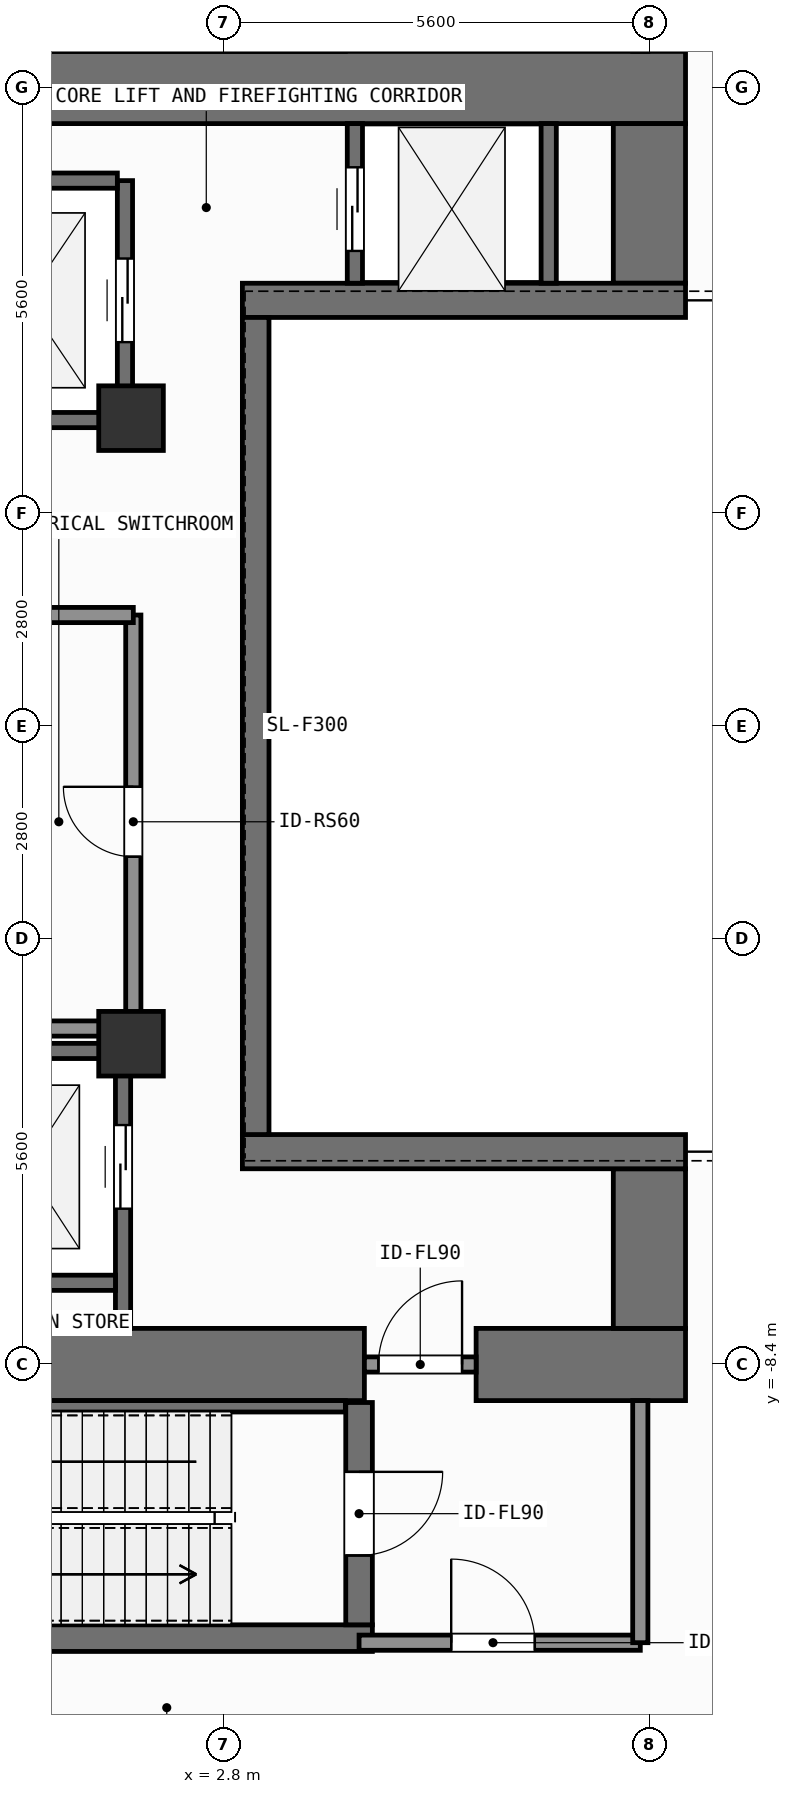
"""IFC4 building model, lengths in metres.
Left out: names, types, materials, properties, quantities, classifications, styles, units other than length and angle.
Written with IfcOpenShell. Run it as: python <this file> out.ifc"""

import sys

from ifc_helpers import new_model, si_unit, direction, frame, frame_2d, origin, origin_2d, place, context, subcontext, project, spatial, rectangle, extrude, element, fill, save


model = new_model("IFC4")
c1 = context("Model", 3, precision=1e-05, world=origin(), true_north=direction((0.0, 1.0)))
c2 = subcontext(c1, "Body", "Model", "MODEL_VIEW")
j1 = project(units=[si_unit("LENGTHUNIT", "METRE"), si_unit("PLANEANGLEUNIT", "RADIAN")], contexts=[c1])
p1 = place(None, origin())
s1 = spatial("IfcSite", under=j1, at=p1, CompositionType="ELEMENT")
p2 = place(p1, origin())
s2 = spatial("IfcBuilding", under=s1, at=p2, CompositionType="ELEMENT")
p3 = place(p2, frame((0.0, 0.0, 156.3)))
s3 = spatial("IfcBuildingStorey", under=s2, at=p3, CompositionType="ELEMENT", Elevation=156.3)
p4 = place(p3, frame((-2.62, -8.4, 0.0), z_axis=(0.0, 0.0, 1.0), x_axis=(1.0, 0.0, 0.0)))
e1 = element("IfcWall", 1, at=p4, inside=s3, PredefinedType="SHEAR", context=c2, shape_type="SweptSolid", body=[
    extrude(rectangle(XDim=7.27, YDim=0.95, at=frame_2d((3.635, 0.0))), origin(), (0.0, 0.0, 1.0), 7.8),
])
p5 = place(p3, frame((6.12, -8.4, 0.0), z_axis=(0.0, 0.0, 1.0), x_axis=(1.0, 0.0, 0.0)))
e2 = element("IfcWall", 2, at=p5, inside=s3, PredefinedType="SHEAR", context=c2, shape_type="SweptSolid", body=[
    extrude(rectangle(XDim=2.755, YDim=0.95, at=frame_2d((1.377, 0.0))), origin(), (0.0, 0.0, 1.0), 7.8),
])
p6 = place(p3, frame((-7.55, 8.4, 0.0), z_axis=(0.0, 0.0, 1.0), x_axis=(1.0, 0.0, 0.0)))
e3 = element("IfcWall", 3, at=p6, inside=s3, PredefinedType="SHEAR", context=c2, shape_type="SweptSolid", body=[
    extrude(rectangle(XDim=16.425, YDim=0.95, at=frame_2d((8.212, 0.0))), origin(), (0.0, 0.0, 1.0), 7.8),
])
for number, where, z_axis, x_axis in (
    (4, (8.4, -7.925, 0.0), (0.0, 0.0, 1.0), (0.0, 1.0, 0.0)),
    (5, (8.4, 5.825, 0.0), (0.0, 0.0, 1.0), (0.0, 1.0, 0.0)),
):
    element("IfcWall", number, at=place(p3, frame(where, z_axis=z_axis, x_axis=x_axis)), inside=s3, PredefinedType="SHEAR", context=c2, shape_type="SweptSolid", body=[
        extrude(rectangle(XDim=2.1, YDim=0.95, at=frame_2d((1.05, 0.0))), origin(), (0.0, 0.0, 1.0), 7.8),
    ])
for number, where, z_axis, x_axis in (
    (6, (3.045, -5.6, 0.0), (0.0, 0.0, 1.0), (1.0, 0.0, 0.0)),
    (7, (3.045, 5.6, 0.0), (0.0, 0.0, 1.0), (1.0, 0.0, 0.0)),
):
    element("IfcWall", number, at=place(p3, frame(where, z_axis=z_axis, x_axis=x_axis)), inside=s3, PredefinedType="SHEAR", context=c2, shape_type="SweptSolid", body=[
        extrude(rectangle(XDim=5.83, YDim=0.45, at=frame_2d((2.915, 0.0))), origin(), (0.0, 0.0, 1.0), 7.8),
    ])
p7 = place(p3, frame((3.22, -5.375, 0.0), z_axis=(0.0, 0.0, 1.0), x_axis=(0.0, 1.0, 0.0)))
e8 = element("IfcWall", 8, at=p7, inside=s3, PredefinedType="SHEAR", context=c2, shape_type="SweptSolid", body=[
    extrude(rectangle(XDim=10.75, YDim=0.35, at=frame_2d((5.375, 0.0))), origin(), (0.0, 0.0, 1.0), 7.8),
])
p8 = place(p3, frame((-2.555, -12.0, 0.0), z_axis=(0.0, 0.0, 1.0), x_axis=(1.0, 0.0, 0.0)))
e9 = element("IfcWall", 9, at=p8, inside=s3, PredefinedType="SHEAR", context=c2, shape_type="SweptSolid", body=[
    extrude(rectangle(XDim=7.31, YDim=0.35, at=frame_2d((3.655, 0.0))), origin(), (0.0, 0.0, 1.0), 7.8),
])
p9 = place(p3, frame((-2.2, -8.95, 0.0), z_axis=(0.0, 0.0, 1.0), x_axis=(1.0, 0.0, 0.0)))
e10 = element("IfcWall", 10, at=p9, inside=s3, PredefinedType="SHEAR", context=c2, shape_type="SweptSolid", body=[
    extrude(rectangle(XDim=6.6, YDim=0.15, at=frame_2d((3.3, 0.0))), origin(), (0.0, 0.0, 1.0), 7.8),
])
p10 = place(p3, frame((4.58, -8.9, 0.0), z_axis=(0.0, 0.0, 1.0), x_axis=(0.0, -1.0, 0.0)))
e11 = element("IfcWall", 11, at=p10, inside=s3, PredefinedType="SHEAR", context=c2, shape_type="SweptSolid", body=[
    extrude(rectangle(XDim=2.925, YDim=0.35, at=frame_2d((1.462, 0.0))), origin(), (0.0, 0.0, 1.0), 7.8),
])
p11 = place(p10, frame((0.913, 0.0, 0.0)))
e12 = element("IfcOpeningElement", 12, at=p11, cuts=e11, PredefinedType="OPENING", context=c2, shape_type="SweptSolid", body=[
    extrude(rectangle(XDim=1.1, YDim=2.15, at=frame_2d((0.55, 1.075))), frame((0.0, 0.185, 0.0), z_axis=(0.0, -1.0, 0.0), x_axis=(1.0, 0.0, 0.0)), (0.0, 0.0, 1.0), 0.37),
])
for number, where, z_axis, x_axis in (
    (13, (1.58, -4.18, 0.0), (0.0, 0.0, 1.0), (1.0, 0.0, 0.0)),
    (14, (1.58, 4.05, 0.0), (0.0, 0.0, 1.0), (1.0, 0.0, 0.0)),
):
    element("IfcColumn", number, at=place(p3, frame(where, z_axis=z_axis, x_axis=x_axis)), inside=s3, PredefinedType="COLUMN", context=c2, shape_type="SweptSolid", body=[
        extrude(rectangle(XDim=0.85, YDim=0.85, at=origin_2d()), origin(), (0.0, 0.0, 1.0), 7.8),
    ])
p12 = place(p3, frame((1.5, 4.025, 0.0), z_axis=(0.0, 0.0, 1.0), x_axis=(0.0, 1.0, 0.0)))
e15 = element("IfcWall", 15, at=p12, inside=s3, PredefinedType="SHEAR", context=c2, shape_type="SweptSolid", body=[
    extrude(rectangle(XDim=3.15, YDim=0.2, at=frame_2d((1.575, 0.0))), origin(), (0.0, 0.0, 1.0), 7.58),
])
p13 = place(p12, frame((1.025, 0.0, 0.0)))
e16 = element("IfcOpeningElement", 16, at=p13, cuts=e15, PredefinedType="OPENING", context=c2, shape_type="SweptSolid", body=[
    extrude(rectangle(XDim=1.1, YDim=2.2, at=frame_2d((0.55, 1.1))), frame((0.0, 0.11, 0.0), z_axis=(0.0, -1.0, 0.0), x_axis=(1.0, 0.0, 0.0)), (0.0, 0.0, 1.0), 0.22),
])
for number, where, z_axis, x_axis in (
    (17, (-1.0, 4.025, 0.0), (0.0, 0.0, 1.0), (1.0, 0.0, 0.0)),
    (18, (-1.0, 7.175, 0.0), (0.0, 0.0, 1.0), (1.0, 0.0, 0.0)),
):
    element("IfcWall", number, at=place(p3, frame(where, z_axis=z_axis, x_axis=x_axis)), inside=s3, PredefinedType="SHEAR", context=c2, shape_type="SweptSolid", body=[
        extrude(rectangle(XDim=2.4, YDim=0.2, at=frame_2d((1.2, 0.0))), origin(), (0.0, 0.0, 1.0), 7.58),
    ])
p14 = place(p3, frame((1.475, -7.925, 0.0), z_axis=(0.0, 0.0, 1.0), x_axis=(0.0, 1.0, 0.0)))
e19 = element("IfcWall", 19, at=p14, inside=s3, PredefinedType="SHEAR", context=c2, shape_type="SweptSolid", body=[
    extrude(rectangle(XDim=3.65, YDim=0.2, at=frame_2d((1.825, 0.0))), origin(), (0.0, 0.0, 1.0), 7.58),
])
p15 = place(p14, frame((1.575, 0.0, 0.0)))
e20 = element("IfcOpeningElement", 20, at=p15, cuts=e19, PredefinedType="OPENING", context=c2, shape_type="SweptSolid", body=[
    extrude(rectangle(XDim=1.1, YDim=2.2, at=frame_2d((0.55, 1.1))), frame((0.0, 0.11, 0.0), z_axis=(0.0, -1.0, 0.0), x_axis=(1.0, 0.0, 0.0)), (0.0, 0.0, 1.0), 0.22),
])
for number, where, z_axis, x_axis in (
    (21, (-0.975, -7.325, 0.0), (0.0, 0.0, 1.0), (1.0, 0.0, 0.0)),
    (22, (-0.975, -4.275, 0.0), (0.0, 0.0, 1.0), (1.0, 0.0, 0.0)),
):
    element("IfcWall", number, at=place(p3, frame(where, z_axis=z_axis, x_axis=x_axis)), inside=s3, PredefinedType="SHEAR", context=c2, shape_type="SweptSolid", body=[
        extrude(rectangle(XDim=2.35, YDim=0.2, at=frame_2d((1.175, 0.0))), origin(), (0.0, 0.0, 1.0), 7.58),
    ])
p16 = place(p3, frame((4.525, 5.825, 0.0), z_axis=(0.0, 0.0, 1.0), x_axis=(0.0, 1.0, 0.0)))
e23 = element("IfcWall", 23, at=p16, inside=s3, PredefinedType="SHEAR", context=c2, shape_type="SweptSolid", body=[
    extrude(rectangle(XDim=2.1, YDim=0.2, at=frame_2d((1.05, 0.0))), origin(), (0.0, 0.0, 1.0), 7.58),
])
p17 = place(p16, frame((0.425, 0.0, 0.0)))
e24 = element("IfcOpeningElement", 24, at=p17, cuts=e23, PredefinedType="OPENING", context=c2, shape_type="SweptSolid", body=[
    extrude(rectangle(XDim=1.1, YDim=2.2, at=frame_2d((0.55, 1.1))), frame((0.0, 0.11, 0.0), z_axis=(0.0, -1.0, 0.0), x_axis=(1.0, 0.0, 0.0)), (0.0, 0.0, 1.0), 0.22),
])
p18 = place(p3, frame((7.075, 5.825, 0.0), z_axis=(0.0, 0.0, 1.0), x_axis=(0.0, 1.0, 0.0)))
e25 = element("IfcWall", 25, at=p18, inside=s3, PredefinedType="SHEAR", context=c2, shape_type="SweptSolid", body=[
    extrude(rectangle(XDim=2.1, YDim=0.2, at=frame_2d((1.05, 0.0))), origin(), (0.0, 0.0, 1.0), 7.58),
])
p19 = place(p3, frame((4.58, -12.06, 0.0), z_axis=(0.0, 0.0, 1.0), x_axis=(1.0, 0.0, 0.0)))
e26 = element("IfcWall", 26, at=p19, inside=s3, PredefinedType="SOLIDWALL", context=c2, shape_type="SweptSolid", body=[
    extrude(rectangle(XDim=3.7, YDim=0.2, at=frame_2d((1.85, 0.0))), origin(), (0.0, 0.0, 1.0), 7.58),
])
p20 = place(p19, frame((1.212, 0.0, 0.0)))
e27 = element("IfcOpeningElement", 27, at=p20, cuts=e26, PredefinedType="OPENING", context=c2, shape_type="SweptSolid", body=[
    extrude(rectangle(XDim=1.1, YDim=2.15, at=frame_2d((0.55, 1.075))), frame((0.0, 0.11, 0.0), z_axis=(0.0, -1.0, 0.0), x_axis=(1.0, 0.0, 0.0)), (0.0, 0.0, 1.0), 0.22),
])
p21 = place(p3, frame((4.65, -8.4, 0.0), z_axis=(0.0, 0.0, 1.0), x_axis=(1.0, 0.0, 0.0)))
e28 = element("IfcWall", 28, at=p21, inside=s3, PredefinedType="SOLIDWALL", context=c2, shape_type="SweptSolid", body=[
    extrude(rectangle(XDim=1.47, YDim=0.2, at=frame_2d((0.735, 0.0))), origin(), (0.0, 0.0, 1.0), 6.62),
])
p22 = place(p21, frame((0.185, 0.0, 0.0)))
e29 = element("IfcOpeningElement", 29, at=p22, cuts=e28, PredefinedType="OPENING", context=c2, shape_type="SweptSolid", body=[
    extrude(rectangle(XDim=1.1, YDim=2.15, at=frame_2d((0.55, 1.075))), frame((0.0, 0.11, 0.0), z_axis=(0.0, -1.0, 0.0), x_axis=(1.0, 0.0, 0.0)), (0.0, 0.0, 1.0), 0.22),
])
p23 = place(p3, frame((1.61, -3.98, 0.0), z_axis=(0.0, 0.0, 1.0), x_axis=(0.0, 1.0, 0.0)))
e30 = element("IfcWall", 30, at=p23, inside=s3, PredefinedType="SOLIDWALL", context=c2, shape_type="SweptSolid", body=[
    extrude(rectangle(XDim=5.44, YDim=0.2, at=frame_2d((2.72, 0.0))), origin(), (0.0, 0.0, 1.0), 7.58),
])
p24 = place(p23, frame((2.26, 0.0, 0.0)))
e31 = element("IfcOpeningElement", 31, at=p24, cuts=e30, PredefinedType="OPENING", context=c2, shape_type="SweptSolid", body=[
    extrude(rectangle(XDim=0.92, YDim=2.1, at=frame_2d((0.46, 1.05))), frame((0.0, 0.11, 0.0), z_axis=(0.0, -1.0, 0.0), x_axis=(1.0, 0.0, 0.0)), (0.0, 0.0, 1.0), 0.22),
])
p25 = place(p3, frame((8.28, -12.06, 0.0), z_axis=(0.0, 0.0, 1.0), x_axis=(0.0, 1.0, 0.0)))
e32 = element("IfcWall", 32, at=p25, inside=s3, PredefinedType="SOLIDWALL", context=c2, shape_type="SweptSolid", body=[
    extrude(rectangle(XDim=3.185, YDim=0.2, at=frame_2d((1.593, 0.0))), origin(), (0.0, 0.0, 1.0), 7.58),
])
for number, where, z_axis, x_axis in (
    (33, (-1.58, -3.98, 0.0), (0.0, 0.0, 1.0), (1.0, 0.0, 0.0)),
    (34, (-1.58, 1.46, 0.0), (0.0, 0.0, 1.0), (1.0, 0.0, 0.0)),
):
    element("IfcWall", number, at=place(p3, frame(where, z_axis=z_axis, x_axis=x_axis)), inside=s3, PredefinedType="SOLIDWALL", context=c2, shape_type="SweptSolid", body=[
        extrude(rectangle(XDim=3.19, YDim=0.2, at=frame_2d((1.595, 0.0))), origin(), (0.0, 0.0, 1.0), 7.58),
    ])
p26 = place(p13, origin())
e35 = element("IfcDoor", 35, at=p26, inside=s3, OperationType="SLIDING_TO_LEFT", PredefinedType="DOOR", context=c2, shape_type="SweptSolid", body=[
    extrude(rectangle(XDim=1.1, YDim=2.2, at=frame_2d((0.55, 1.1))), frame((0.0, 0.025, 0.0), z_axis=(0.0, -1.0, 0.0), x_axis=(1.0, 0.0, 0.0)), (0.0, 0.0, 1.0), 0.05),
])
fill(e16, e35)
p27 = place(p15, origin())
e36 = element("IfcDoor", 36, at=p27, inside=s3, OperationType="SLIDING_TO_LEFT", PredefinedType="DOOR", context=c2, shape_type="SweptSolid", body=[
    extrude(rectangle(XDim=1.1, YDim=2.2, at=frame_2d((0.55, 1.1))), frame((0.0, 0.025, 0.0), z_axis=(0.0, -1.0, 0.0), x_axis=(1.0, 0.0, 0.0)), (0.0, 0.0, 1.0), 0.05),
])
fill(e20, e36)
p28 = place(p17, origin())
e37 = element("IfcDoor", 37, at=p28, inside=s3, OperationType="SLIDING_TO_LEFT", PredefinedType="DOOR", context=c2, shape_type="SweptSolid", body=[
    extrude(rectangle(XDim=1.1, YDim=2.2, at=frame_2d((0.55, 1.1))), frame((0.0, 0.025, 0.0), z_axis=(0.0, -1.0, 0.0), x_axis=(1.0, 0.0, 0.0)), (0.0, 0.0, 1.0), 0.05),
])
fill(e24, e37)
p29 = place(p11, origin())
e38 = element("IfcDoor", 38, at=p29, inside=s3, OperationType="SINGLE_SWING_LEFT", PredefinedType="DOOR", context=c2, shape_type="SweptSolid", body=[
    extrude(rectangle(XDim=1.1, YDim=2.15, at=frame_2d((0.55, 1.075))), frame((0.0, 0.025, 0.0), z_axis=(0.0, -1.0, 0.0), x_axis=(1.0, 0.0, 0.0)), (0.0, 0.0, 1.0), 0.05),
])
fill(e12, e38)
p30 = place(p20, origin())
e39 = element("IfcDoor", 39, at=p30, inside=s3, OperationType="SINGLE_SWING_LEFT", PredefinedType="DOOR", context=c2, shape_type="SweptSolid", body=[
    extrude(rectangle(XDim=1.1, YDim=2.15, at=frame_2d((0.55, 1.075))), frame((0.0, 0.025, 0.0), z_axis=(0.0, -1.0, 0.0), x_axis=(1.0, 0.0, 0.0)), (0.0, 0.0, 1.0), 0.05),
])
fill(e27, e39)
p31 = place(p22, origin())
e40 = element("IfcDoor", 40, at=p31, inside=s3, OperationType="SINGLE_SWING_RIGHT", PredefinedType="DOOR", context=c2, shape_type="SweptSolid", body=[
    extrude(rectangle(XDim=1.1, YDim=2.15, at=frame_2d((0.55, 1.075))), frame((0.0, 0.025, 0.0), z_axis=(0.0, -1.0, 0.0), x_axis=(1.0, 0.0, 0.0)), (0.0, 0.0, 1.0), 0.05),
])
fill(e29, e40)
p32 = place(p24, origin())
e41 = element("IfcDoor", 41, at=p32, inside=s3, OperationType="SINGLE_SWING_RIGHT", PredefinedType="DOOR", context=c2, shape_type="SweptSolid", body=[
    extrude(rectangle(XDim=0.92, YDim=2.1, at=frame_2d((0.46, 1.05))), frame((0.0, 0.025, 0.0), z_axis=(0.0, -1.0, 0.0), x_axis=(1.0, 0.0, 0.0)), (0.0, 0.0, 1.0), 0.05),
])
fill(e31, e41)
save(model, sys.argv[1])
